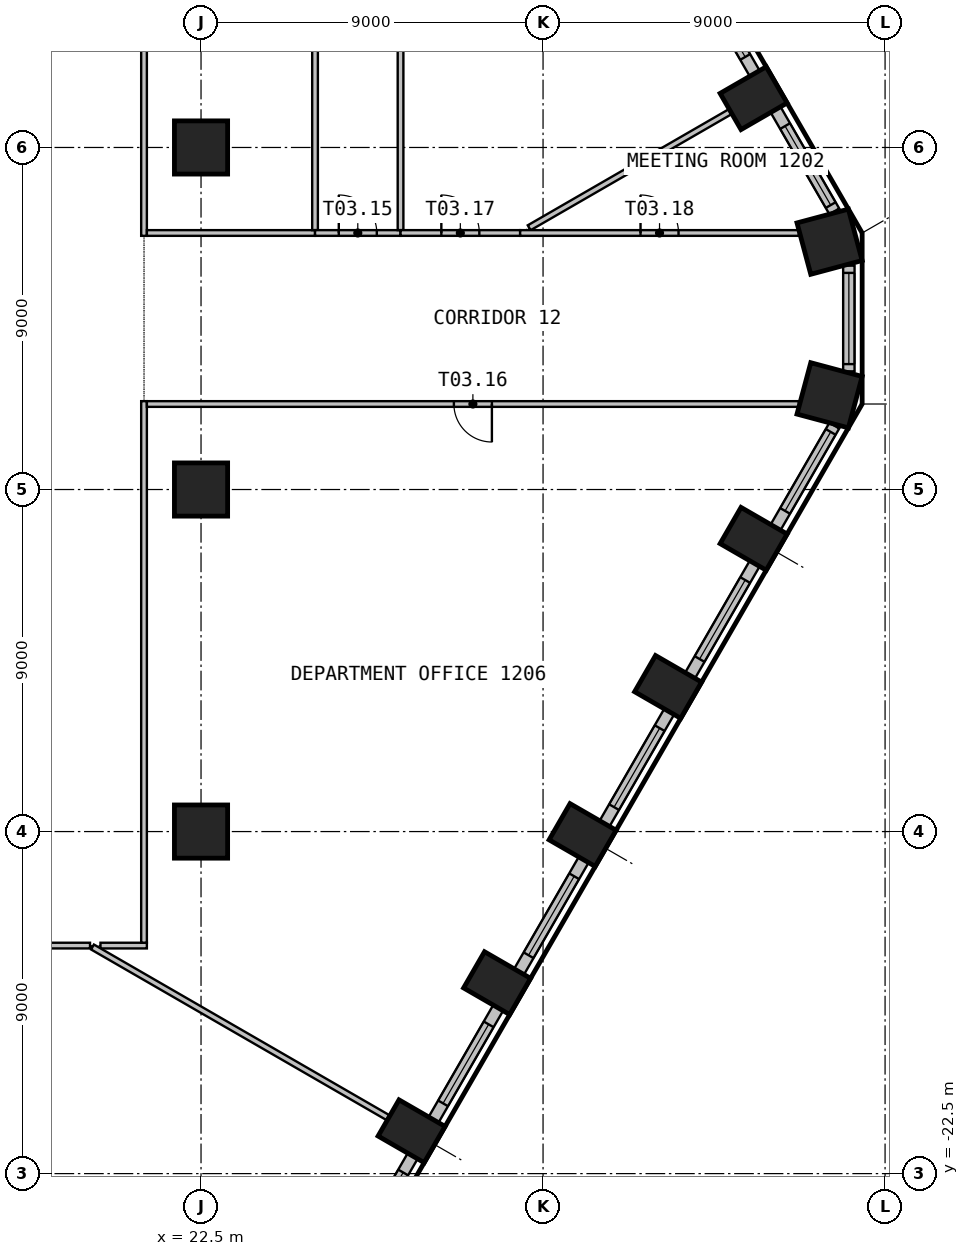
"""IFC4 building model, lengths in metres.
Left out: names, types, materials, properties, quantities, classifications, styles, units other than length and angle.
Written with IfcOpenShell. Run it as: python <this file> out.ifc"""

import sys

from ifc_helpers import new_model, si_unit, direction, frame, frame_2d, origin, origin_2d, place, context, subcontext, project, spatial, rectangle, circle, extrude, element, fill, save


model = new_model("IFC4")
c1 = context("Model", 3, precision=1e-05, world=origin(), true_north=direction((0.0, 1.0)))
c2 = subcontext(c1, "Body", "Model", "MODEL_VIEW")
j1 = project(units=[si_unit("LENGTHUNIT", "METRE"), si_unit("PLANEANGLEUNIT", "RADIAN")], contexts=[c1])
p1 = place(None, origin())
s1 = spatial("IfcSite", under=j1, at=p1, CompositionType="ELEMENT")
p2 = place(p1, origin())
s2 = spatial("IfcBuilding", under=s1, at=p2, CompositionType="ELEMENT")
p3 = place(p2, frame((0.0, 0.0, 53.4)))
s3 = spatial("IfcBuildingStorey", under=s2, at=p3, CompositionType="ELEMENT", Elevation=53.4)
for number, where, z_axis, x_axis in (
    (1, (28.041, -21.385, 0.0), (0.0, 0.0, 1.0), (0.5, 0.866, 0.0)),
    (2, (30.291, -17.489, 0.0), (0.0, 0.0, 1.0), (0.5, 0.866, 0.0)),
    (3, (32.541, -13.591, 0.0), (0.0, 0.0, 1.0), (0.5, 0.866, 0.0)),
    (4, (34.791, -9.694, 0.0), (0.0, 0.0, 1.0), (0.5, 0.866, 0.0)),
    (5, (37.041, -5.797, 0.0), (0.0, 0.0, 1.0), (0.5, 0.866, 0.0)),
):
    element("IfcColumn", number, at=place(p3, frame(where, z_axis=z_axis, x_axis=x_axis)), inside=s3, PredefinedType="COLUMN", context=c2, shape_type="SweptSolid", body=[
        extrude(rectangle(XDim=1.1, YDim=1.4, at=origin_2d()), origin(), (0.0, 0.0, 1.0), 3.525),
    ])
for number, where, z_axis, x_axis in (
    (6, (39.04, -2.02, 0.0), (0.0, 0.0, 1.0), (0.259, 0.966, 0.0)),
    (7, (39.04, 2.02, 0.0), (0.0, 0.0, 1.0), (-0.259, 0.966, 0.0)),
):
    element("IfcColumn", number, at=place(p3, frame(where, z_axis=z_axis, x_axis=x_axis)), inside=s3, PredefinedType="COLUMN", context=c2, shape_type="SweptSolid", body=[
        extrude(rectangle(XDim=1.4, YDim=1.4, at=origin_2d()), origin(), (0.0, 0.0, 1.0), 3.525),
    ])
p4 = place(p3, frame((37.041, 5.797, 0.0), z_axis=(0.0, 0.0, 1.0), x_axis=(-0.5, 0.866025403784, 0.0)))
e8 = element("IfcColumn", 8, at=p4, inside=s3, PredefinedType="COLUMN", context=c2, shape_type="SweptSolid", body=[
    extrude(rectangle(XDim=1.1, YDim=1.4, at=origin_2d()), origin(), (0.0, 0.0, 1.0), 3.525),
])
for number, where, z_axis, x_axis in (
    (9, (22.5, -13.5, 0.0), (0.0, 0.0, 1.0), (1.0, 0.0, 0.0)),
    (10, (22.5, -4.5, 0.0), (0.0, 0.0, 1.0), (1.0, 0.0, 0.0)),
    (11, (22.5, 4.5, 0.0), (0.0, 0.0, 1.0), (1.0, 0.0, 0.0)),
):
    element("IfcColumn", number, at=place(p3, frame(where, z_axis=z_axis, x_axis=x_axis)), inside=s3, PredefinedType="COLUMN", context=c2, shape_type="SweptSolid", body=[
        extrude(circle(Radius=0.7, at=origin_2d()), origin(), (0.0, 0.0, 1.0), 3.525),
    ])
p5 = place(p3, frame((26.369, -24.981, 0.0), z_axis=(0.0, 0.0, 1.0), x_axis=(0.499993955907, 0.866028893315, 0.0)))
e12 = element("IfcWall", 12, at=p5, inside=s3, PredefinedType="SOLIDWALL", context=c2, shape_type="SweptSolid", body=[
    extrude(rectangle(XDim=3.399, YDim=0.3, at=frame_2d((1.699, 0.0))), origin(), (0.0, 0.0, 1.0), 3.525),
])
p6 = place(p5, frame((0.5, 0.0, 0.9)))
e13 = element("IfcOpeningElement", 13, at=p6, cuts=e12, PredefinedType="OPENING", context=c2, shape_type="SweptSolid", body=[
    extrude(rectangle(XDim=2.4, YDim=2.1, at=frame_2d((1.2, 1.05))), frame((0.0, 0.16, 0.0), z_axis=(0.0, -1.0, 0.0), x_axis=(1.0, 0.0, 0.0)), (0.0, 0.0, 1.0), 0.32),
])
p7 = place(p3, frame((28.619, -21.084, 0.0), z_axis=(0.0, 0.0, 1.0), x_axis=(0.499993955907, 0.866028893315, 0.0)))
e14 = element("IfcWall", 14, at=p7, inside=s3, PredefinedType="SOLIDWALL", context=c2, shape_type="SweptSolid", body=[
    extrude(rectangle(XDim=3.399, YDim=0.3, at=frame_2d((1.699, 0.0))), origin(), (0.0, 0.0, 1.0), 3.525),
])
p8 = place(p7, frame((0.5, 0.0, 0.9)))
e15 = element("IfcOpeningElement", 15, at=p8, cuts=e14, PredefinedType="OPENING", context=c2, shape_type="SweptSolid", body=[
    extrude(rectangle(XDim=2.4, YDim=2.1, at=frame_2d((1.2, 1.05))), frame((0.0, 0.16, 0.0), z_axis=(0.0, -1.0, 0.0), x_axis=(1.0, 0.0, 0.0)), (0.0, 0.0, 1.0), 0.32),
])
p9 = place(p3, frame((30.869, -17.187, 0.0), z_axis=(0.0, 0.0, 1.0), x_axis=(0.499993955907, 0.866028893315, 0.0)))
e16 = element("IfcWall", 16, at=p9, inside=s3, PredefinedType="SOLIDWALL", context=c2, shape_type="SweptSolid", body=[
    extrude(rectangle(XDim=3.399, YDim=0.3, at=frame_2d((1.699, 0.0))), origin(), (0.0, 0.0, 1.0), 3.525),
])
p10 = place(p9, frame((0.5, 0.0, 0.9)))
e17 = element("IfcOpeningElement", 17, at=p10, cuts=e16, PredefinedType="OPENING", context=c2, shape_type="SweptSolid", body=[
    extrude(rectangle(XDim=2.4, YDim=2.1, at=frame_2d((1.2, 1.05))), frame((0.0, 0.16, 0.0), z_axis=(0.0, -1.0, 0.0), x_axis=(1.0, 0.0, 0.0)), (0.0, 0.0, 1.0), 0.32),
])
p11 = place(p3, frame((33.119, -13.29, 0.0), z_axis=(0.0, 0.0, 1.0), x_axis=(0.499993955907, 0.866028893315, 0.0)))
e18 = element("IfcWall", 18, at=p11, inside=s3, PredefinedType="SOLIDWALL", context=c2, shape_type="SweptSolid", body=[
    extrude(rectangle(XDim=3.399, YDim=0.3, at=frame_2d((1.699, 0.0))), origin(), (0.0, 0.0, 1.0), 3.525),
])
p12 = place(p11, frame((0.5, 0.0, 0.9)))
e19 = element("IfcOpeningElement", 19, at=p12, cuts=e18, PredefinedType="OPENING", context=c2, shape_type="SweptSolid", body=[
    extrude(rectangle(XDim=2.4, YDim=2.1, at=frame_2d((1.2, 1.05))), frame((0.0, 0.16, 0.0), z_axis=(0.0, -1.0, 0.0), x_axis=(1.0, 0.0, 0.0)), (0.0, 0.0, 1.0), 0.32),
])
p13 = place(p3, frame((35.369, -9.393, 0.0), z_axis=(0.0, 0.0, 1.0), x_axis=(0.499993955907, 0.866028893315, 0.0)))
e20 = element("IfcWall", 20, at=p13, inside=s3, PredefinedType="SOLIDWALL", context=c2, shape_type="SweptSolid", body=[
    extrude(rectangle(XDim=3.399, YDim=0.3, at=frame_2d((1.699, 0.0))), origin(), (0.0, 0.0, 1.0), 3.525),
])
p14 = place(p13, frame((0.5, 0.0, 0.9)))
e21 = element("IfcOpeningElement", 21, at=p14, cuts=e20, PredefinedType="OPENING", context=c2, shape_type="SweptSolid", body=[
    extrude(rectangle(XDim=2.4, YDim=2.1, at=frame_2d((1.2, 1.05))), frame((0.0, 0.16, 0.0), z_axis=(0.0, -1.0, 0.0), x_axis=(1.0, 0.0, 0.0)), (0.0, 0.0, 1.0), 0.32),
])
p15 = place(p3, frame((37.619, -5.495, 0.0), z_axis=(0.0, 0.0, 1.0), x_axis=(0.49997090907, 0.866042198789, 0.0)))
e22 = element("IfcWall", 22, at=p15, inside=s3, PredefinedType="SOLIDWALL", context=c2, shape_type="SweptSolid", body=[
    extrude(rectangle(XDim=3.091, YDim=0.3, at=frame_2d((1.545, 0.0))), origin(), (0.0, 0.0, 1.0), 3.525),
])
p16 = place(p15, frame((0.5, 0.0, 0.9)))
e23 = element("IfcOpeningElement", 23, at=p16, cuts=e22, PredefinedType="OPENING", context=c2, shape_type="SweptSolid", body=[
    extrude(rectangle(XDim=2.4, YDim=2.1, at=frame_2d((1.2, 1.05))), frame((0.0, 0.16, 0.0), z_axis=(0.0, -1.0, 0.0), x_axis=(1.0, 0.0, 0.0)), (0.0, 0.0, 1.0), 0.32),
])
p17 = place(p3, frame((39.547, -1.391, 0.0), z_axis=(0.0, 0.0, 1.0), x_axis=(0.0, 1.0, 0.0)))
e24 = element("IfcWall", 24, at=p17, inside=s3, PredefinedType="SOLIDWALL", context=c2, shape_type="SweptSolid", body=[
    extrude(rectangle(XDim=2.782, YDim=0.3, at=frame_2d((1.391, 0.0))), origin(), (0.0, 0.0, 1.0), 3.525),
])
p18 = place(p17, frame((0.191, 0.0, 0.9)))
e25 = element("IfcOpeningElement", 25, at=p18, cuts=e24, PredefinedType="OPENING", context=c2, shape_type="SweptSolid", body=[
    extrude(rectangle(XDim=2.4, YDim=2.1, at=frame_2d((1.2, 1.05))), frame((0.0, 0.16, 0.0), z_axis=(0.0, -1.0, 0.0), x_axis=(1.0, 0.0, 0.0)), (0.0, 0.0, 1.0), 0.32),
])
p19 = place(p3, frame((39.165, 2.819, 0.0), z_axis=(0.0, 0.0, 1.0), x_axis=(-0.49997090907, 0.866042198789, 0.0)))
e26 = element("IfcWall", 26, at=p19, inside=s3, PredefinedType="SOLIDWALL", context=c2, shape_type="SweptSolid", body=[
    extrude(rectangle(XDim=3.091, YDim=0.3, at=frame_2d((1.545, 0.0))), origin(), (0.0, 0.0, 1.0), 3.525),
])
p20 = place(p19, frame((0.191, 0.0, 0.9)))
e27 = element("IfcOpeningElement", 27, at=p20, cuts=e26, PredefinedType="OPENING", context=c2, shape_type="SweptSolid", body=[
    extrude(rectangle(XDim=2.4, YDim=2.1, at=frame_2d((1.2, 1.05))), frame((0.0, 0.16, 0.0), z_axis=(0.0, -1.0, 0.0), x_axis=(1.0, 0.0, 0.0)), (0.0, 0.0, 1.0), 0.32),
])
p21 = place(p3, frame((37.069, 6.449, 0.0), z_axis=(0.0, 0.0, 1.0), x_axis=(-0.499993955907, 0.866028893315, 0.0)))
e28 = element("IfcWall", 28, at=p21, inside=s3, PredefinedType="SOLIDWALL", context=c2, shape_type="SweptSolid", body=[
    extrude(rectangle(XDim=3.399, YDim=0.3, at=frame_2d((1.699, 0.0))), origin(), (0.0, 0.0, 1.0), 3.525),
])
p22 = place(p21, frame((0.5, 0.0, 0.9)))
e29 = element("IfcOpeningElement", 29, at=p22, cuts=e28, PredefinedType="OPENING", context=c2, shape_type="SweptSolid", body=[
    extrude(rectangle(XDim=2.4, YDim=2.1, at=frame_2d((1.2, 1.05))), frame((0.0, 0.16, 0.0), z_axis=(0.0, -1.0, 0.0), x_axis=(1.0, 0.0, 0.0)), (0.0, 0.0, 1.0), 0.32),
])
p23 = place(p3, frame((15.75, -16.5, 0.0), z_axis=(0.0, 0.0, 1.0), x_axis=(1.0, 0.0, 0.0)))
e30 = element("IfcWall", 30, at=p23, inside=s3, PredefinedType="PARTITIONING", context=c2, shape_type="SweptSolid", body=[
    extrude(rectangle(XDim=3.829, YDim=0.15, at=frame_2d((1.915, 0.0))), origin(), (0.0, 0.0, 1.0), 3.525),
])
p24 = place(p23, frame((1.415, 0.0, 0.0)))
e31 = element("IfcOpeningElement", 31, at=p24, cuts=e30, PredefinedType="OPENING", context=c2, shape_type="SweptSolid", body=[
    extrude(rectangle(XDim=1.0, YDim=2.1, at=frame_2d((0.5, 1.05))), frame((0.0, 0.085, 0.0), z_axis=(0.0, -1.0, 0.0), x_axis=(1.0, 0.0, 0.0)), (0.0, 0.0, 1.0), 0.17),
])
p25 = place(p3, frame((19.854, -16.5, 0.0), z_axis=(0.0, 0.0, 1.0), x_axis=(1.0, 0.0, 0.0)))
e32 = element("IfcWall", 32, at=p25, inside=s3, PredefinedType="PARTITIONING", context=c2, shape_type="SweptSolid", body=[
    extrude(rectangle(XDim=1.221, YDim=0.15, at=frame_2d((0.61, 0.0))), origin(), (0.0, 0.0, 1.0), 3.525),
])
p26 = place(p3, frame((19.644, -16.538, 0.0), z_axis=(0.0, 0.0, 1.0), x_axis=(0.866004853516, -0.500035592419, 0.0)))
e33 = element("IfcWall", 33, at=p26, inside=s3, PredefinedType="PARTITIONING", context=c2, shape_type="SweptSolid", body=[
    extrude(rectangle(XDim=8.976, YDim=0.15, at=frame_2d((4.488, 0.0))), origin(), (0.0, 0.0, 1.0), 3.525),
])
p27 = place(p3, frame((21.0, -16.425, 0.0), z_axis=(0.0, 0.0, 1.0), x_axis=(0.0, 1.0, 0.0)))
e34 = element("IfcWall", 34, at=p27, inside=s3, PredefinedType="PARTITIONING", context=c2, shape_type="SweptSolid", body=[
    extrude(rectangle(XDim=14.25, YDim=0.15, at=frame_2d((7.125, 0.0))), origin(), (0.0, 0.0, 1.0), 3.525),
])
p28 = place(p3, frame((38.233, -2.25, 0.0), z_axis=(0.0, 0.0, 1.0), x_axis=(-1.0, 0.0, 0.0)))
e35 = element("IfcWall", 35, at=p28, inside=s3, PredefinedType="PARTITIONING", context=c2, shape_type="SweptSolid", body=[
    extrude(rectangle(XDim=17.158, YDim=0.15, at=frame_2d((8.579, 0.0))), origin(), (0.0, 0.0, 1.0), 3.525),
])
p29 = place(p28, frame((8.079, 0.0, 0.0)))
e36 = element("IfcOpeningElement", 36, at=p29, cuts=e35, PredefinedType="OPENING", context=c2, shape_type="SweptSolid", body=[
    extrude(rectangle(XDim=1.0, YDim=2.1, at=frame_2d((0.5, 1.05))), frame((0.0, 0.085, 0.0), z_axis=(0.0, -1.0, 0.0), x_axis=(1.0, 0.0, 0.0)), (0.0, 0.0, 1.0), 0.17),
])
p30 = place(p3, frame((21.0, 2.175, 0.0), z_axis=(0.0, 0.0, 1.0), x_axis=(0.0, 1.0, 0.0)))
e37 = element("IfcWall", 37, at=p30, inside=s3, PredefinedType="PARTITIONING", context=c2, shape_type="SweptSolid", body=[
    extrude(rectangle(XDim=14.25, YDim=0.15, at=frame_2d((7.125, 0.0))), origin(), (0.0, 0.0, 1.0), 3.525),
])
p31 = place(p30, frame((6.625, 0.0, 0.0)))
e38 = element("IfcOpeningElement", 38, at=p31, cuts=e37, PredefinedType="OPENING", context=c2, shape_type="SweptSolid", body=[
    extrude(rectangle(XDim=1.0, YDim=2.1, at=frame_2d((0.5, 1.05))), frame((0.0, 0.085, 0.0), z_axis=(0.0, -1.0, 0.0), x_axis=(1.0, 0.0, 0.0)), (0.0, 0.0, 1.0), 0.17),
])
p32 = place(p3, frame((21.075, 2.25, 0.0), z_axis=(0.0, 0.0, 1.0), x_axis=(1.0, 0.0, 0.0)))
e39 = element("IfcWall", 39, at=p32, inside=s3, PredefinedType="PARTITIONING", context=c2, shape_type="SweptSolid", body=[
    extrude(rectangle(XDim=4.425, YDim=0.15, at=frame_2d((2.212, 0.0))), origin(), (0.0, 0.0, 1.0), 3.525),
])
p33 = place(p3, frame((25.5, 24.457, 0.0), z_axis=(0.0, 0.0, 1.0), x_axis=(0.0, -1.0, 0.0)))
e40 = element("IfcWall", 40, at=p33, inside=s3, PredefinedType="PARTITIONING", context=c2, shape_type="SweptSolid", body=[
    extrude(rectangle(XDim=22.132, YDim=0.15, at=frame_2d((11.066, 0.0))), origin(), (0.0, 0.0, 1.0), 3.525),
])
p34 = place(p3, frame((25.5, 2.25, 0.0), z_axis=(0.0, 0.0, 1.0), x_axis=(1.0, 0.0, 0.0)))
e41 = element("IfcWall", 41, at=p34, inside=s3, PredefinedType="PARTITIONING", context=c2, shape_type="SweptSolid", body=[
    extrude(rectangle(XDim=2.25, YDim=0.15, at=frame_2d((1.125, 0.0))), origin(), (0.0, 0.0, 1.0), 3.525),
])
p35 = place(p34, frame((0.625, 0.0, 0.0)))
e42 = element("IfcOpeningElement", 42, at=p35, cuts=e41, PredefinedType="OPENING", context=c2, shape_type="SweptSolid", body=[
    extrude(rectangle(XDim=1.0, YDim=2.1, at=frame_2d((0.5, 1.05))), frame((0.0, 0.085, 0.0), z_axis=(0.0, -1.0, 0.0), x_axis=(1.0, 0.0, 0.0)), (0.0, 0.0, 1.0), 0.17),
])
p36 = place(p3, frame((27.75, 20.56, 0.0), z_axis=(0.0, 0.0, 1.0), x_axis=(0.0, -1.0, 0.0)))
e43 = element("IfcWall", 43, at=p36, inside=s3, PredefinedType="PARTITIONING", context=c2, shape_type="SweptSolid", body=[
    extrude(rectangle(XDim=18.235, YDim=0.15, at=frame_2d((9.117, 0.0))), origin(), (0.0, 0.0, 1.0), 3.525),
])
p37 = place(p3, frame((27.75, 2.25, 0.0), z_axis=(0.0, 0.0, 1.0), x_axis=(1.0, 0.0, 0.0)))
e44 = element("IfcWall", 44, at=p37, inside=s3, PredefinedType="PARTITIONING", context=c2, shape_type="SweptSolid", body=[
    extrude(rectangle(XDim=3.147, YDim=0.15, at=frame_2d((1.573, 0.0))), origin(), (0.0, 0.0, 1.0), 3.525),
])
p38 = place(p37, frame((1.073, 0.0, 0.0)))
e45 = element("IfcOpeningElement", 45, at=p38, cuts=e44, PredefinedType="OPENING", context=c2, shape_type="SweptSolid", body=[
    extrude(rectangle(XDim=1.0, YDim=2.1, at=frame_2d((0.5, 1.05))), frame((0.0, 0.085, 0.0), z_axis=(0.0, -1.0, 0.0), x_axis=(1.0, 0.0, 0.0)), (0.0, 0.0, 1.0), 0.17),
])
p39 = place(p3, frame((36.417, 5.437, 0.0), z_axis=(0.0, 0.0, 1.0), x_axis=(-0.866007603866, -0.500030829096, 0.0)))
e46 = element("IfcWall", 46, at=p39, inside=s3, PredefinedType="PARTITIONING", context=c2, shape_type="SweptSolid", body=[
    extrude(rectangle(XDim=6.099, YDim=0.15, at=frame_2d((3.05, 0.0))), origin(), (0.0, 0.0, 1.0), 3.525),
])
p40 = place(p3, frame((30.897, 2.25, 0.0), z_axis=(0.0, 0.0, 1.0), x_axis=(1.0, 0.0, 0.0)))
e47 = element("IfcWall", 47, at=p40, inside=s3, PredefinedType="PARTITIONING", context=c2, shape_type="SweptSolid", body=[
    extrude(rectangle(XDim=7.336, YDim=0.15, at=frame_2d((3.668, 0.0))), origin(), (0.0, 0.0, 1.0), 3.525),
])
p41 = place(p40, frame((3.168, 0.0, 0.0)))
e48 = element("IfcOpeningElement", 48, at=p41, cuts=e47, PredefinedType="OPENING", context=c2, shape_type="SweptSolid", body=[
    extrude(rectangle(XDim=1.0, YDim=2.1, at=frame_2d((0.5, 1.05))), frame((0.0, 0.085, 0.0), z_axis=(0.0, -1.0, 0.0), x_axis=(1.0, 0.0, 0.0)), (0.0, 0.0, 1.0), 0.17),
])
p42 = place(p6, origin())
e49 = element("IfcWindow", 49, at=p42, inside=s3, PartitioningType="SINGLE_PANEL", PredefinedType="WINDOW", context=c2, shape_type="SweptSolid", body=[
    extrude(rectangle(XDim=2.4, YDim=2.1, at=frame_2d((1.2, 1.05))), frame((0.0, 0.03, 0.0), z_axis=(0.0, -1.0, 0.0), x_axis=(1.0, 0.0, 0.0)), (0.0, 0.0, 1.0), 0.06),
])
fill(e13, e49)
p43 = place(p8, origin())
e50 = element("IfcWindow", 50, at=p43, inside=s3, PartitioningType="SINGLE_PANEL", PredefinedType="WINDOW", context=c2, shape_type="SweptSolid", body=[
    extrude(rectangle(XDim=2.4, YDim=2.1, at=frame_2d((1.2, 1.05))), frame((0.0, 0.03, 0.0), z_axis=(0.0, -1.0, 0.0), x_axis=(1.0, 0.0, 0.0)), (0.0, 0.0, 1.0), 0.06),
])
fill(e15, e50)
p44 = place(p10, origin())
e51 = element("IfcWindow", 51, at=p44, inside=s3, PartitioningType="SINGLE_PANEL", PredefinedType="WINDOW", context=c2, shape_type="SweptSolid", body=[
    extrude(rectangle(XDim=2.4, YDim=2.1, at=frame_2d((1.2, 1.05))), frame((0.0, 0.03, 0.0), z_axis=(0.0, -1.0, 0.0), x_axis=(1.0, 0.0, 0.0)), (0.0, 0.0, 1.0), 0.06),
])
fill(e17, e51)
p45 = place(p12, origin())
e52 = element("IfcWindow", 52, at=p45, inside=s3, PartitioningType="SINGLE_PANEL", PredefinedType="WINDOW", context=c2, shape_type="SweptSolid", body=[
    extrude(rectangle(XDim=2.4, YDim=2.1, at=frame_2d((1.2, 1.05))), frame((0.0, 0.03, 0.0), z_axis=(0.0, -1.0, 0.0), x_axis=(1.0, 0.0, 0.0)), (0.0, 0.0, 1.0), 0.06),
])
fill(e19, e52)
p46 = place(p14, origin())
e53 = element("IfcWindow", 53, at=p46, inside=s3, PartitioningType="SINGLE_PANEL", PredefinedType="WINDOW", context=c2, shape_type="SweptSolid", body=[
    extrude(rectangle(XDim=2.4, YDim=2.1, at=frame_2d((1.2, 1.05))), frame((0.0, 0.03, 0.0), z_axis=(0.0, -1.0, 0.0), x_axis=(1.0, 0.0, 0.0)), (0.0, 0.0, 1.0), 0.06),
])
fill(e21, e53)
p47 = place(p16, origin())
e54 = element("IfcWindow", 54, at=p47, inside=s3, PartitioningType="SINGLE_PANEL", PredefinedType="WINDOW", context=c2, shape_type="SweptSolid", body=[
    extrude(rectangle(XDim=2.4, YDim=2.1, at=frame_2d((1.2, 1.05))), frame((0.0, 0.03, 0.0), z_axis=(0.0, -1.0, 0.0), x_axis=(1.0, 0.0, 0.0)), (0.0, 0.0, 1.0), 0.06),
])
fill(e23, e54)
p48 = place(p18, origin())
e55 = element("IfcWindow", 55, at=p48, inside=s3, PartitioningType="SINGLE_PANEL", PredefinedType="WINDOW", context=c2, shape_type="SweptSolid", body=[
    extrude(rectangle(XDim=2.4, YDim=2.1, at=frame_2d((1.2, 1.05))), frame((0.0, 0.03, 0.0), z_axis=(0.0, -1.0, 0.0), x_axis=(1.0, 0.0, 0.0)), (0.0, 0.0, 1.0), 0.06),
])
fill(e25, e55)
p49 = place(p20, origin())
e56 = element("IfcWindow", 56, at=p49, inside=s3, PartitioningType="SINGLE_PANEL", PredefinedType="WINDOW", context=c2, shape_type="SweptSolid", body=[
    extrude(rectangle(XDim=2.4, YDim=2.1, at=frame_2d((1.2, 1.05))), frame((0.0, 0.03, 0.0), z_axis=(0.0, -1.0, 0.0), x_axis=(1.0, 0.0, 0.0)), (0.0, 0.0, 1.0), 0.06),
])
fill(e27, e56)
p50 = place(p22, origin())
e57 = element("IfcWindow", 57, at=p50, inside=s3, PartitioningType="SINGLE_PANEL", PredefinedType="WINDOW", context=c2, shape_type="SweptSolid", body=[
    extrude(rectangle(XDim=2.4, YDim=2.1, at=frame_2d((1.2, 1.05))), frame((0.0, 0.03, 0.0), z_axis=(0.0, -1.0, 0.0), x_axis=(1.0, 0.0, 0.0)), (0.0, 0.0, 1.0), 0.06),
])
fill(e29, e57)
p51 = place(p35, origin())
e58 = element("IfcDoor", 58, at=p51, inside=s3, OperationType="SINGLE_SWING_RIGHT", PredefinedType="DOOR", context=c2, shape_type="SweptSolid", body=[
    extrude(rectangle(XDim=1.0, YDim=2.1, at=frame_2d((0.5, 1.05))), frame((0.0, 0.025, 0.0), z_axis=(0.0, -1.0, 0.0), x_axis=(1.0, 0.0, 0.0)), (0.0, 0.0, 1.0), 0.05),
])
fill(e42, e58)
p52 = place(p29, origin())
e59 = element("IfcDoor", 59, at=p52, inside=s3, OperationType="SINGLE_SWING_LEFT", PredefinedType="DOOR", context=c2, shape_type="SweptSolid", body=[
    extrude(rectangle(XDim=1.0, YDim=2.1, at=frame_2d((0.5, 1.05))), frame((0.0, 0.025, 0.0), z_axis=(0.0, -1.0, 0.0), x_axis=(1.0, 0.0, 0.0)), (0.0, 0.0, 1.0), 0.05),
])
fill(e36, e59)
p53 = place(p38, origin())
e60 = element("IfcDoor", 60, at=p53, inside=s3, OperationType="SINGLE_SWING_RIGHT", PredefinedType="DOOR", context=c2, shape_type="SweptSolid", body=[
    extrude(rectangle(XDim=1.0, YDim=2.1, at=frame_2d((0.5, 1.05))), frame((0.0, 0.025, 0.0), z_axis=(0.0, -1.0, 0.0), x_axis=(1.0, 0.0, 0.0)), (0.0, 0.0, 1.0), 0.05),
])
fill(e45, e60)
p54 = place(p41, origin())
e61 = element("IfcDoor", 61, at=p54, inside=s3, OperationType="SINGLE_SWING_RIGHT", PredefinedType="DOOR", context=c2, shape_type="SweptSolid", body=[
    extrude(rectangle(XDim=1.0, YDim=2.1, at=frame_2d((0.5, 1.05))), frame((0.0, 0.025, 0.0), z_axis=(0.0, -1.0, 0.0), x_axis=(1.0, 0.0, 0.0)), (0.0, 0.0, 1.0), 0.05),
])
fill(e48, e61)
save(model, sys.argv[1])
